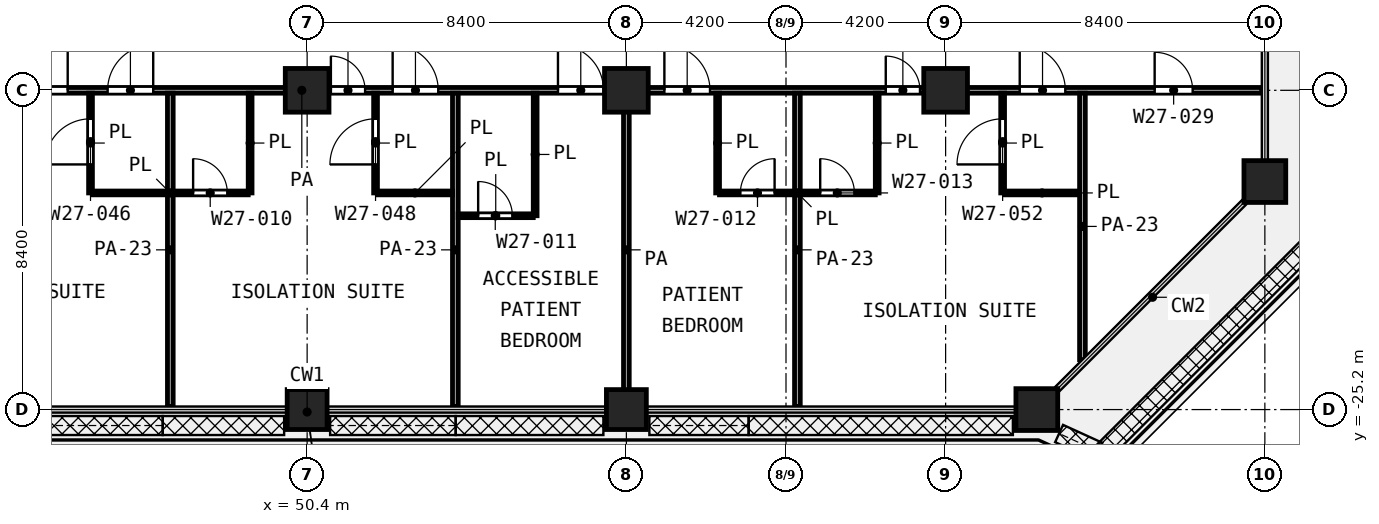
"""IFC4 building model, lengths in metres.
Left out: names, types, materials, properties, quantities, classifications, styles, units other than length and angle.
Written with IfcOpenShell. Run it as: python <this file> out.ifc"""

import sys

from ifc_helpers import new_model, si_unit, direction, frame, frame_2d, origin, origin_2d, place, context, subcontext, project, spatial, rectangle, extrude, element, fill, save


model = new_model("IFC4")
c1 = context("Model", 3, precision=1e-05, world=origin(), true_north=direction((0.0, 1.0)))
c2 = subcontext(c1, "Body", "Model", "MODEL_VIEW")
j1 = project(units=[si_unit("LENGTHUNIT", "METRE"), si_unit("PLANEANGLEUNIT", "RADIAN")], contexts=[c1])
p1 = place(None, origin())
s1 = spatial("IfcSite", under=j1, at=p1, CompositionType="ELEMENT")
p2 = place(p1, origin())
s2 = spatial("IfcBuilding", under=s1, at=p2, CompositionType="ELEMENT")
p3 = place(p2, frame((0.0, 0.0, 140.8)))
s3 = spatial("IfcBuildingStorey", under=s2, at=p3, CompositionType="ELEMENT", Elevation=140.8)
for number, where, z_axis, x_axis in (
    (1, (50.4, -16.8, 0.0), (0.0, 0.0, 1.0), (1.0, 0.0, 0.0)),
    (2, (58.8, -16.8, 0.0), (0.0, 0.0, 1.0), (1.0, 0.0, 0.0)),
    (3, (67.2, -16.8, 0.0), (0.0, 0.0, 1.0), (1.0, 0.0, 0.0)),
):
    element("IfcColumn", number, at=place(p3, frame(where, z_axis=z_axis, x_axis=x_axis)), inside=s3, PredefinedType="COLUMN", context=c2, shape_type="SweptSolid", body=[
        extrude(rectangle(XDim=1.15, YDim=1.15, at=origin_2d()), origin(), (0.0, 0.0, 1.0), 4.2),
    ])
p4 = place(p3, frame((75.6, -19.2, 0.0), z_axis=(0.0, 0.0, 1.0), x_axis=(1.0, 0.0, 0.0)))
e4 = element("IfcColumn", 4, at=p4, inside=s3, PredefinedType="COLUMN", context=c2, shape_type="SweptSolid", body=[
    extrude(rectangle(XDim=1.1, YDim=1.1, at=origin_2d()), origin(), (0.0, 0.0, 1.0), 4.2),
])
for number, where, z_axis, x_axis in (
    (5, (50.4, -25.2, 0.0), (0.0, 0.0, 1.0), (1.0, 0.0, 0.0)),
    (6, (58.8, -25.2, 0.0), (0.0, 0.0, 1.0), (1.0, 0.0, 0.0)),
):
    element("IfcColumn", number, at=place(p3, frame(where, z_axis=z_axis, x_axis=x_axis)), inside=s3, PredefinedType="COLUMN", context=c2, shape_type="SweptSolid", body=[
        extrude(rectangle(XDim=1.05, YDim=1.05, at=origin_2d()), origin(), (0.0, 0.0, 1.0), 4.2),
    ])
p5 = place(p3, frame((69.6, -25.2, 0.0), z_axis=(0.0, 0.0, 1.0), x_axis=(1.0, 0.0, 0.0)))
e7 = element("IfcColumn", 7, at=p5, inside=s3, PredefinedType="COLUMN", context=c2, shape_type="SweptSolid", body=[
    extrude(rectangle(XDim=1.1, YDim=1.1, at=origin_2d()), origin(), (0.0, 0.0, 1.0), 4.2),
])
p6 = place(p3, frame((54.375, -20.1, 0.0), z_axis=(0.0, 0.0, 1.0), x_axis=(1.0, 0.0, 0.0)))
e8 = element("IfcWall", 8, at=p6, inside=s3, PredefinedType="PARTITIONING", context=c2, shape_type="SweptSolid", body=[
    extrude(rectangle(XDim=1.975, YDim=0.1, at=frame_2d((0.988, 0.0))), origin(), (0.0, 0.0, 1.0), 3.6),
])
p7 = place(p6, frame((0.525, 0.0, 0.0)))
e9 = element("IfcOpeningElement", 9, at=p7, cuts=e8, PredefinedType="OPENING", context=c2, shape_type="SweptSolid", body=[
    extrude(rectangle(XDim=0.9, YDim=2.1, at=frame_2d((0.45, 1.05))), frame((0.0, 0.06, 0.0), z_axis=(0.0, -1.0, 0.0), x_axis=(1.0, 0.0, 0.0)), (0.0, 0.0, 1.0), 0.12),
])
p8 = place(p3, frame((44.75, -19.5, 0.0), z_axis=(0.0, 0.0, 1.0), x_axis=(1.0, 0.0, 0.0)))
e10 = element("IfcWall", 10, at=p8, inside=s3, PredefinedType="PARTITIONING", context=c2, shape_type="SweptSolid", body=[
    extrude(rectangle(XDim=4.1, YDim=0.1, at=frame_2d((2.05, 0.0))), origin(), (0.0, 0.0, 1.0), 3.6),
])
p9 = place(p8, frame((2.65, 0.0, 0.0)))
e11 = element("IfcOpeningElement", 11, at=p9, cuts=e10, PredefinedType="OPENING", context=c2, shape_type="SweptSolid", body=[
    extrude(rectangle(XDim=0.9, YDim=2.1, at=frame_2d((0.45, 1.05))), frame((0.0, 0.06, 0.0), z_axis=(0.0, -1.0, 0.0), x_axis=(1.0, 0.0, 0.0)), (0.0, 0.0, 1.0), 0.12),
])
p10 = place(p3, frame((52.25, -19.5, 0.0), z_axis=(0.0, 0.0, 1.0), x_axis=(1.0, 0.0, 0.0)))
e12 = element("IfcWall", 12, at=p10, inside=s3, PredefinedType="PARTITIONING", context=c2, shape_type="SweptSolid", body=[
    extrude(rectangle(XDim=1.975, YDim=0.1, at=frame_2d((0.988, 0.0))), origin(), (0.0, 0.0, 1.0), 3.6),
])
p11 = place(p3, frame((61.25, -19.5, 0.0), z_axis=(0.0, 0.0, 1.0), x_axis=(1.0, 0.0, 0.0)))
e13 = element("IfcWall", 13, at=p11, inside=s3, PredefinedType="PARTITIONING", context=c2, shape_type="SweptSolid", body=[
    extrude(rectangle(XDim=4.1, YDim=0.1, at=frame_2d((2.05, 0.0))), origin(), (0.0, 0.0, 1.0), 3.6),
])
p12 = place(p11, frame((0.55, 0.0, 0.0)))
e14 = element("IfcOpeningElement", 14, at=p12, cuts=e13, PredefinedType="OPENING", context=c2, shape_type="SweptSolid", body=[
    extrude(rectangle(XDim=0.9, YDim=2.1, at=frame_2d((0.45, 1.05))), frame((0.0, 0.06, 0.0), z_axis=(0.0, -1.0, 0.0), x_axis=(1.0, 0.0, 0.0)), (0.0, 0.0, 1.0), 0.12),
])
p13 = place(p11, frame((2.65, 0.0, 0.0)))
e15 = element("IfcOpeningElement", 15, at=p13, cuts=e13, PredefinedType="OPENING", context=c2, shape_type="SweptSolid", body=[
    extrude(rectangle(XDim=0.9, YDim=2.1, at=frame_2d((0.45, 1.05))), frame((0.0, 0.06, 0.0), z_axis=(0.0, -1.0, 0.0), x_axis=(1.0, 0.0, 0.0)), (0.0, 0.0, 1.0), 0.12),
])
p14 = place(p3, frame((68.75, -19.5, 0.0), z_axis=(0.0, 0.0, 1.0), x_axis=(1.0, 0.0, 0.0)))
e16 = element("IfcWall", 16, at=p14, inside=s3, PredefinedType="PARTITIONING", context=c2, shape_type="SweptSolid", body=[
    extrude(rectangle(XDim=1.975, YDim=0.1, at=frame_2d((0.988, 0.0))), origin(), (0.0, 0.0, 1.0), 3.6),
])
p15 = place(p3, frame((44.7, -19.5, 0.0), z_axis=(0.0, 0.0, 1.0), x_axis=(0.0, 1.0, 0.0)))
e17 = element("IfcWall", 17, at=p15, inside=s3, PredefinedType="PARTITIONING", context=c2, shape_type="SweptSolid", body=[
    extrude(rectangle(XDim=2.625, YDim=0.1, at=frame_2d((1.312, 0.0))), origin(), (0.0, 0.0, 1.0), 3.6),
])
p16 = place(p15, frame((0.75, 0.0, 0.0)))
e18 = element("IfcOpeningElement", 18, at=p16, cuts=e17, PredefinedType="OPENING", context=c2, shape_type="SweptSolid", body=[
    extrude(rectangle(XDim=1.2, YDim=2.1, at=frame_2d((0.6, 1.05))), frame((0.0, 0.06, 0.0), z_axis=(0.0, -1.0, 0.0), x_axis=(1.0, 0.0, 0.0)), (0.0, 0.0, 1.0), 0.12),
])
p17 = place(p3, frame((48.9, -19.5, 0.0), z_axis=(0.0, 0.0, 1.0), x_axis=(0.0, 1.0, 0.0)))
e19 = element("IfcWall", 19, at=p17, inside=s3, PredefinedType="PARTITIONING", context=c2, shape_type="SweptSolid", body=[
    extrude(rectangle(XDim=2.625, YDim=0.1, at=frame_2d((1.312, 0.0))), origin(), (0.0, 0.0, 1.0), 3.6),
])
p18 = place(p3, frame((52.2, -19.5, 0.0), z_axis=(0.0, 0.0, 1.0), x_axis=(0.0, 1.0, 0.0)))
e20 = element("IfcWall", 20, at=p18, inside=s3, PredefinedType="PARTITIONING", context=c2, shape_type="SweptSolid", body=[
    extrude(rectangle(XDim=2.625, YDim=0.1, at=frame_2d((1.312, 0.0))), origin(), (0.0, 0.0, 1.0), 3.6),
])
p19 = place(p18, frame((0.75, 0.0, 0.0)))
e21 = element("IfcOpeningElement", 21, at=p19, cuts=e20, PredefinedType="OPENING", context=c2, shape_type="SweptSolid", body=[
    extrude(rectangle(XDim=1.2, YDim=2.1, at=frame_2d((0.6, 1.05))), frame((0.0, 0.06, 0.0), z_axis=(0.0, -1.0, 0.0), x_axis=(1.0, 0.0, 0.0)), (0.0, 0.0, 1.0), 0.12),
])
p20 = place(p3, frame((56.4, -20.1, 0.0), z_axis=(0.0, 0.0, 1.0), x_axis=(0.0, 1.0, 0.0)))
e22 = element("IfcWall", 22, at=p20, inside=s3, PredefinedType="PARTITIONING", context=c2, shape_type="SweptSolid", body=[
    extrude(rectangle(XDim=3.225, YDim=0.1, at=frame_2d((1.613, 0.0))), origin(), (0.0, 0.0, 1.0), 3.6),
])
for number, where, z_axis, x_axis in (
    (23, (61.2, -19.5, 0.0), (0.0, 0.0, 1.0), (0.0, 1.0, 0.0)),
    (24, (65.4, -19.5, 0.0), (0.0, 0.0, 1.0), (0.0, 1.0, 0.0)),
):
    element("IfcWall", number, at=place(p3, frame(where, z_axis=z_axis, x_axis=x_axis)), inside=s3, PredefinedType="PARTITIONING", context=c2, shape_type="SweptSolid", body=[
        extrude(rectangle(XDim=2.625, YDim=0.1, at=frame_2d((1.312, 0.0))), origin(), (0.0, 0.0, 1.0), 3.6),
    ])
p21 = place(p3, frame((68.7, -19.5, 0.0), z_axis=(0.0, 0.0, 1.0), x_axis=(0.0, 1.0, 0.0)))
e25 = element("IfcWall", 25, at=p21, inside=s3, PredefinedType="PARTITIONING", context=c2, shape_type="SweptSolid", body=[
    extrude(rectangle(XDim=2.625, YDim=0.1, at=frame_2d((1.312, 0.0))), origin(), (0.0, 0.0, 1.0), 3.6),
])
p22 = place(p21, frame((0.75, 0.0, 0.0)))
e26 = element("IfcOpeningElement", 26, at=p22, cuts=e25, PredefinedType="OPENING", context=c2, shape_type="SweptSolid", body=[
    extrude(rectangle(XDim=1.2, YDim=2.1, at=frame_2d((0.6, 1.05))), frame((0.0, 0.06, 0.0), z_axis=(0.0, -1.0, 0.0), x_axis=(1.0, 0.0, 0.0)), (0.0, 0.0, 1.0), 0.12),
])
p23 = place(p3, frame((25.0, -16.8, 0.0), z_axis=(0.0, 0.0, 1.0), x_axis=(1.0, 0.0, 0.0)))
e27 = element("IfcWall", 27, at=p23, inside=s3, PredefinedType="PARTITIONING", context=c2, shape_type="SweptSolid", body=[
    extrude(rectangle(XDim=50.52, YDim=0.15, at=frame_2d((25.26, 0.0))), origin(), (0.0, 0.0, 1.0), 3.6),
])
p24 = place(p23, frame((1.55, 0.0, 0.0)))
e28 = element("IfcOpeningElement", 28, at=p24, cuts=e27, PredefinedType="OPENING", context=c2, shape_type="SweptSolid", body=[
    extrude(rectangle(XDim=1.5, YDim=2.1, at=frame_2d((0.75, 1.05))), frame((0.0, 0.085, 0.0), z_axis=(0.0, -1.0, 0.0), x_axis=(1.0, 0.0, 0.0)), (0.0, 0.0, 1.0), 0.17),
])
p25 = place(p23, frame((6.0, 0.0, 0.0)))
e29 = element("IfcOpeningElement", 29, at=p25, cuts=e27, PredefinedType="OPENING", context=c2, shape_type="SweptSolid", body=[
    extrude(rectangle(XDim=1.0, YDim=2.1, at=frame_2d((0.5, 1.05))), frame((0.0, 0.085, 0.0), z_axis=(0.0, -1.0, 0.0), x_axis=(1.0, 0.0, 0.0)), (0.0, 0.0, 1.0), 0.17),
])
p26 = place(p23, frame((9.3, 0.0, 0.0)))
e30 = element("IfcOpeningElement", 30, at=p26, cuts=e27, PredefinedType="OPENING", context=c2, shape_type="SweptSolid", body=[
    extrude(rectangle(XDim=1.2, YDim=2.1, at=frame_2d((0.6, 1.05))), frame((0.0, 0.085, 0.0), z_axis=(0.0, -1.0, 0.0), x_axis=(1.0, 0.0, 0.0)), (0.0, 0.0, 1.0), 0.17),
])
p27 = place(p23, frame((17.9, 0.0, 0.0)))
e31 = element("IfcOpeningElement", 31, at=p27, cuts=e27, PredefinedType="OPENING", context=c2, shape_type="SweptSolid", body=[
    extrude(rectangle(XDim=1.2, YDim=2.1, at=frame_2d((0.6, 1.05))), frame((0.0, 0.085, 0.0), z_axis=(0.0, -1.0, 0.0), x_axis=(1.0, 0.0, 0.0)), (0.0, 0.0, 1.0), 0.17),
])
p28 = place(p23, frame((15.2, 0.0, 0.0)))
e32 = element("IfcOpeningElement", 32, at=p28, cuts=e27, PredefinedType="OPENING", context=c2, shape_type="SweptSolid", body=[
    extrude(rectangle(XDim=1.2, YDim=2.1, at=frame_2d((0.6, 1.05))), frame((0.0, 0.085, 0.0), z_axis=(0.0, -1.0, 0.0), x_axis=(1.0, 0.0, 0.0)), (0.0, 0.0, 1.0), 0.17),
])
p29 = place(p23, frame((20.15, 0.0, 0.0)))
e33 = element("IfcOpeningElement", 33, at=p29, cuts=e27, PredefinedType="OPENING", context=c2, shape_type="SweptSolid", body=[
    extrude(rectangle(XDim=1.2, YDim=2.1, at=frame_2d((0.6, 1.05))), frame((0.0, 0.085, 0.0), z_axis=(0.0, -1.0, 0.0), x_axis=(1.0, 0.0, 0.0)), (0.0, 0.0, 1.0), 0.17),
])
p30 = place(p23, frame((26.025, 0.0, 0.0)))
e34 = element("IfcOpeningElement", 34, at=p30, cuts=e27, PredefinedType="OPENING", context=c2, shape_type="SweptSolid", body=[
    extrude(rectangle(XDim=0.9, YDim=2.1, at=frame_2d((0.45, 1.05))), frame((0.0, 0.085, 0.0), z_axis=(0.0, -1.0, 0.0), x_axis=(1.0, 0.0, 0.0)), (0.0, 0.0, 1.0), 0.17),
])
p31 = place(p23, frame((27.65, 0.0, 0.0)))
e35 = element("IfcOpeningElement", 35, at=p31, cuts=e27, PredefinedType="OPENING", context=c2, shape_type="SweptSolid", body=[
    extrude(rectangle(XDim=1.2, YDim=2.1, at=frame_2d((0.6, 1.05))), frame((0.0, 0.085, 0.0), z_axis=(0.0, -1.0, 0.0), x_axis=(1.0, 0.0, 0.0)), (0.0, 0.0, 1.0), 0.17),
])
p32 = place(p23, frame((32.0, 0.0, 0.0)))
e36 = element("IfcOpeningElement", 36, at=p32, cuts=e27, PredefinedType="OPENING", context=c2, shape_type="SweptSolid", body=[
    extrude(rectangle(XDim=1.2, YDim=2.1, at=frame_2d((0.6, 1.05))), frame((0.0, 0.085, 0.0), z_axis=(0.0, -1.0, 0.0), x_axis=(1.0, 0.0, 0.0)), (0.0, 0.0, 1.0), 0.17),
])
p33 = place(p23, frame((34.8, 0.0, 0.0)))
e37 = element("IfcOpeningElement", 37, at=p33, cuts=e27, PredefinedType="OPENING", context=c2, shape_type="SweptSolid", body=[
    extrude(rectangle(XDim=1.2, YDim=2.1, at=frame_2d((0.6, 1.05))), frame((0.0, 0.085, 0.0), z_axis=(0.0, -1.0, 0.0), x_axis=(1.0, 0.0, 0.0)), (0.0, 0.0, 1.0), 0.17),
])
p34 = place(p23, frame((40.625, 0.0, 0.0)))
e38 = element("IfcOpeningElement", 38, at=p34, cuts=e27, PredefinedType="OPENING", context=c2, shape_type="SweptSolid", body=[
    extrude(rectangle(XDim=0.9, YDim=2.1, at=frame_2d((0.45, 1.05))), frame((0.0, 0.085, 0.0), z_axis=(0.0, -1.0, 0.0), x_axis=(1.0, 0.0, 0.0)), (0.0, 0.0, 1.0), 0.17),
])
p35 = place(p23, frame((44.15, 0.0, 0.0)))
e39 = element("IfcOpeningElement", 39, at=p35, cuts=e27, PredefinedType="OPENING", context=c2, shape_type="SweptSolid", body=[
    extrude(rectangle(XDim=1.2, YDim=2.1, at=frame_2d((0.6, 1.05))), frame((0.0, 0.085, 0.0), z_axis=(0.0, -1.0, 0.0), x_axis=(1.0, 0.0, 0.0)), (0.0, 0.0, 1.0), 0.17),
])
p36 = place(p23, frame((47.7, 0.0, 0.0)))
e40 = element("IfcOpeningElement", 40, at=p36, cuts=e27, PredefinedType="OPENING", context=c2, shape_type="SweptSolid", body=[
    extrude(rectangle(XDim=1.0, YDim=2.1, at=frame_2d((0.5, 1.05))), frame((0.0, 0.085, 0.0), z_axis=(0.0, -1.0, 0.0), x_axis=(1.0, 0.0, 0.0)), (0.0, 0.0, 1.0), 0.17),
])
for number, where, z_axis, x_axis in (
    (41, (46.8, -25.12, 0.0), (0.0, 0.0, 1.0), (0.0, 1.0, 0.0)),
    (42, (54.3, -25.12, 0.0), (0.0, 0.0, 1.0), (0.0, 1.0, 0.0)),
):
    element("IfcWall", number, at=place(p3, frame(where, z_axis=z_axis, x_axis=x_axis)), inside=s3, PredefinedType="PARTITIONING", context=c2, shape_type="SweptSolid", body=[
        extrude(rectangle(XDim=8.245, YDim=0.15, at=frame_2d((4.123, 0.0))), origin(), (0.0, 0.0, 1.0), 2.7),
    ])
p37 = place(p3, frame((58.8, -25.12, 0.0), z_axis=(0.0, 0.0, 1.0), x_axis=(0.0, 1.0, 0.0)))
e43 = element("IfcWall", 43, at=p37, inside=s3, PredefinedType="PARTITIONING", context=c2, shape_type="SweptSolid", body=[
    extrude(rectangle(XDim=8.245, YDim=0.15, at=frame_2d((4.123, 0.0))), origin(), (0.0, 0.0, 1.0), 3.6),
])
p38 = place(p3, frame((63.3, -25.12, 0.0), z_axis=(0.0, 0.0, 1.0), x_axis=(0.0, 1.0, 0.0)))
e44 = element("IfcWall", 44, at=p38, inside=s3, PredefinedType="PARTITIONING", context=c2, shape_type="SweptSolid", body=[
    extrude(rectangle(XDim=8.245, YDim=0.15, at=frame_2d((4.123, 0.0))), origin(), (0.0, 0.0, 1.0), 2.7),
])
p39 = place(p3, frame((70.8, -23.887, 0.0), z_axis=(0.0, 0.0, 1.0), x_axis=(0.0, 1.0, 0.0)))
e45 = element("IfcWall", 45, at=p39, inside=s3, PredefinedType="PARTITIONING", context=c2, shape_type="SweptSolid", body=[
    extrude(rectangle(XDim=7.012, YDim=0.15, at=frame_2d((3.506, 0.0))), origin(), (0.0, 0.0, 1.0), 2.7),
])
p40 = place(p27, origin())
e46 = element("IfcDoor", 46, at=p40, inside=s3, OperationType="SINGLE_SWING_RIGHT", PredefinedType="DOOR", context=c2, shape_type="SweptSolid", body=[
    extrude(rectangle(XDim=1.2, YDim=2.1, at=frame_2d((0.6, 1.05))), frame((0.0, 0.025, 0.0), z_axis=(0.0, -1.0, 0.0), x_axis=(1.0, 0.0, 0.0)), (0.0, 0.0, 1.0), 0.05),
])
fill(e31, e46)
p41 = place(p29, origin())
e47 = element("IfcDoor", 47, at=p41, inside=s3, OperationType="SINGLE_SWING_RIGHT", PredefinedType="DOOR", context=c2, shape_type="SweptSolid", body=[
    extrude(rectangle(XDim=1.2, YDim=2.1, at=frame_2d((0.6, 1.05))), frame((0.0, 0.025, 0.0), z_axis=(0.0, -1.0, 0.0), x_axis=(1.0, 0.0, 0.0)), (0.0, 0.0, 1.0), 0.05),
])
fill(e33, e47)
p42 = place(p16, origin())
e48 = element("IfcDoor", 48, at=p42, inside=s3, OperationType="SINGLE_SWING_LEFT", PredefinedType="DOOR", context=c2, shape_type="SweptSolid", body=[
    extrude(rectangle(XDim=1.2, YDim=2.1, at=frame_2d((0.6, 1.05))), frame((0.0, 0.025, 0.0), z_axis=(0.0, -1.0, 0.0), x_axis=(1.0, 0.0, 0.0)), (0.0, 0.0, 1.0), 0.05),
])
fill(e18, e48)
p43 = place(p30, origin())
e49 = element("IfcDoor", 49, at=p43, inside=s3, OperationType="SINGLE_SWING_LEFT", PredefinedType="DOOR", context=c2, shape_type="SweptSolid", body=[
    extrude(rectangle(XDim=0.9, YDim=2.1, at=frame_2d((0.45, 1.05))), frame((0.0, 0.025, 0.0), z_axis=(0.0, -1.0, 0.0), x_axis=(1.0, 0.0, 0.0)), (0.0, 0.0, 1.0), 0.05),
])
fill(e34, e49)
p44 = place(p31, origin())
e50 = element("IfcDoor", 50, at=p44, inside=s3, OperationType="SINGLE_SWING_LEFT", PredefinedType="DOOR", context=c2, shape_type="SweptSolid", body=[
    extrude(rectangle(XDim=1.2, YDim=2.1, at=frame_2d((0.6, 1.05))), frame((0.0, 0.025, 0.0), z_axis=(0.0, -1.0, 0.0), x_axis=(1.0, 0.0, 0.0)), (0.0, 0.0, 1.0), 0.05),
])
fill(e35, e50)
p45 = place(p19, origin())
e51 = element("IfcDoor", 51, at=p45, inside=s3, OperationType="SINGLE_SWING_LEFT", PredefinedType="DOOR", context=c2, shape_type="SweptSolid", body=[
    extrude(rectangle(XDim=1.2, YDim=2.1, at=frame_2d((0.6, 1.05))), frame((0.0, 0.025, 0.0), z_axis=(0.0, -1.0, 0.0), x_axis=(1.0, 0.0, 0.0)), (0.0, 0.0, 1.0), 0.05),
])
fill(e21, e51)
p46 = place(p9, origin())
e52 = element("IfcDoor", 52, at=p46, inside=s3, OperationType="SINGLE_SWING_LEFT", PredefinedType="DOOR", context=c2, shape_type="SweptSolid", body=[
    extrude(rectangle(XDim=0.9, YDim=2.1, at=frame_2d((0.45, 1.05))), frame((0.0, 0.025, 0.0), z_axis=(0.0, -1.0, 0.0), x_axis=(1.0, 0.0, 0.0)), (0.0, 0.0, 1.0), 0.05),
])
fill(e11, e52)
p47 = place(p32, origin())
e53 = element("IfcDoor", 53, at=p47, inside=s3, OperationType="SINGLE_SWING_LEFT", PredefinedType="DOOR", context=c2, shape_type="SweptSolid", body=[
    extrude(rectangle(XDim=1.2, YDim=2.1, at=frame_2d((0.6, 1.05))), frame((0.0, 0.025, 0.0), z_axis=(0.0, -1.0, 0.0), x_axis=(1.0, 0.0, 0.0)), (0.0, 0.0, 1.0), 0.05),
])
fill(e36, e53)
p48 = place(p7, origin())
e54 = element("IfcDoor", 54, at=p48, inside=s3, OperationType="SINGLE_SWING_LEFT", PredefinedType="DOOR", context=c2, shape_type="SweptSolid", body=[
    extrude(rectangle(XDim=0.9, YDim=2.1, at=frame_2d((0.45, 1.05))), frame((0.0, 0.025, 0.0), z_axis=(0.0, -1.0, 0.0), x_axis=(1.0, 0.0, 0.0)), (0.0, 0.0, 1.0), 0.05),
])
fill(e9, e54)
p49 = place(p33, origin())
e55 = element("IfcDoor", 55, at=p49, inside=s3, OperationType="SINGLE_SWING_LEFT", PredefinedType="DOOR", context=c2, shape_type="SweptSolid", body=[
    extrude(rectangle(XDim=1.2, YDim=2.1, at=frame_2d((0.6, 1.05))), frame((0.0, 0.025, 0.0), z_axis=(0.0, -1.0, 0.0), x_axis=(1.0, 0.0, 0.0)), (0.0, 0.0, 1.0), 0.05),
])
fill(e37, e55)
p50 = place(p12, origin())
e56 = element("IfcDoor", 56, at=p50, inside=s3, OperationType="SINGLE_SWING_RIGHT", PredefinedType="DOOR", context=c2, shape_type="SweptSolid", body=[
    extrude(rectangle(XDim=0.9, YDim=2.1, at=frame_2d((0.45, 1.05))), frame((0.0, 0.025, 0.0), z_axis=(0.0, -1.0, 0.0), x_axis=(1.0, 0.0, 0.0)), (0.0, 0.0, 1.0), 0.05),
])
fill(e14, e56)
p51 = place(p34, origin())
e57 = element("IfcDoor", 57, at=p51, inside=s3, OperationType="SINGLE_SWING_LEFT", PredefinedType="DOOR", context=c2, shape_type="SweptSolid", body=[
    extrude(rectangle(XDim=0.9, YDim=2.1, at=frame_2d((0.45, 1.05))), frame((0.0, 0.025, 0.0), z_axis=(0.0, -1.0, 0.0), x_axis=(1.0, 0.0, 0.0)), (0.0, 0.0, 1.0), 0.05),
])
fill(e38, e57)
p52 = place(p35, origin())
e58 = element("IfcDoor", 58, at=p52, inside=s3, OperationType="SINGLE_SWING_LEFT", PredefinedType="DOOR", context=c2, shape_type="SweptSolid", body=[
    extrude(rectangle(XDim=1.2, YDim=2.1, at=frame_2d((0.6, 1.05))), frame((0.0, 0.025, 0.0), z_axis=(0.0, -1.0, 0.0), x_axis=(1.0, 0.0, 0.0)), (0.0, 0.0, 1.0), 0.05),
])
fill(e39, e58)
p53 = place(p22, origin())
e59 = element("IfcDoor", 59, at=p53, inside=s3, OperationType="SINGLE_SWING_LEFT", PredefinedType="DOOR", context=c2, shape_type="SweptSolid", body=[
    extrude(rectangle(XDim=1.2, YDim=2.1, at=frame_2d((0.6, 1.05))), frame((0.0, 0.025, 0.0), z_axis=(0.0, -1.0, 0.0), x_axis=(1.0, 0.0, 0.0)), (0.0, 0.0, 1.0), 0.05),
])
fill(e26, e59)
p54 = place(p13, origin())
e60 = element("IfcDoor", 60, at=p54, inside=s3, OperationType="SINGLE_SWING_LEFT", PredefinedType="DOOR", context=c2, shape_type="SweptSolid", body=[
    extrude(rectangle(XDim=0.9, YDim=2.1, at=frame_2d((0.45, 1.05))), frame((0.0, 0.025, 0.0), z_axis=(0.0, -1.0, 0.0), x_axis=(1.0, 0.0, 0.0)), (0.0, 0.0, 1.0), 0.05),
])
fill(e15, e60)
p55 = place(p36, origin())
e61 = element("IfcDoor", 61, at=p55, inside=s3, OperationType="SINGLE_SWING_LEFT", PredefinedType="DOOR", context=c2, shape_type="SweptSolid", body=[
    extrude(rectangle(XDim=1.0, YDim=2.1, at=frame_2d((0.5, 1.05))), frame((0.0, 0.025, 0.0), z_axis=(0.0, -1.0, 0.0), x_axis=(1.0, 0.0, 0.0)), (0.0, 0.0, 1.0), 0.05),
])
fill(e40, e61)
save(model, sys.argv[1])
